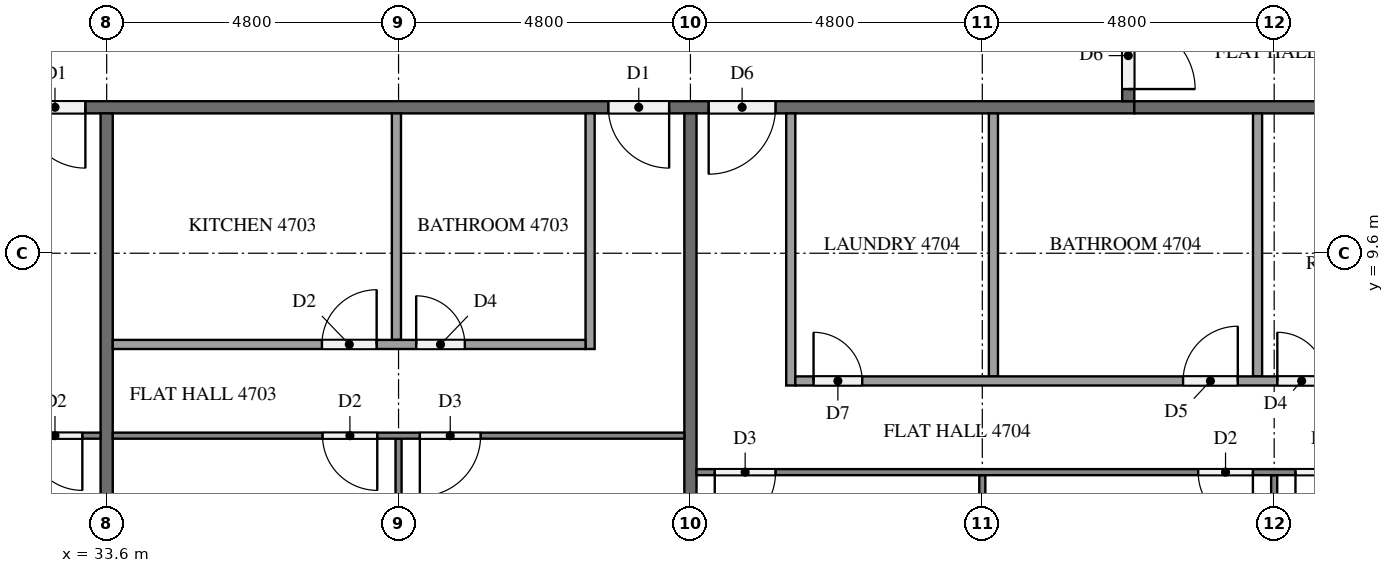
"""IFC4 building model, lengths in metres.
Left out: names, types, materials, properties, quantities, classifications, styles, units other than length and angle.
Written with IfcOpenShell. Run it as: python <this file> out.ifc"""

import sys

from ifc_helpers import new_model, si_unit, direction, frame, frame_2d, origin, place, context, subcontext, project, spatial, rectangle, extrude, element, fill, save


model = new_model("IFC4")
c1 = context("Model", 3, precision=1e-05, world=origin(), true_north=direction((0.0, 1.0)))
c2 = subcontext(c1, "Body", "Model", "MODEL_VIEW")
j1 = project(units=[si_unit("LENGTHUNIT", "METRE"), si_unit("PLANEANGLEUNIT", "RADIAN")], contexts=[c1])
p1 = place(None, origin())
s1 = spatial("IfcSite", under=j1, at=p1, CompositionType="ELEMENT")
p2 = place(p1, origin())
s2 = spatial("IfcBuilding", under=s1, at=p2, CompositionType="ELEMENT")
p3 = place(p2, frame((0.0, 0.0, 182.4)))
s3 = spatial("IfcBuildingStorey", under=s2, at=p3, CompositionType="ELEMENT", Elevation=182.4)
p4 = place(p3, frame((50.5, 12.0, 0.0), z_axis=(0.0, 0.0, 1.0), x_axis=(-1.0, 0.0, 0.0)))
e1 = element("IfcWall", 1, at=p4, inside=s3, PredefinedType="PARTITIONING", context=c2, shape_type="SweptSolid", body=[
    extrude(rectangle(XDim=38.6, YDim=0.2, at=frame_2d((19.3, 0.0))), origin(), (0.0, 0.0, 1.0), 3.2),
])
p5 = place(p4, frame((31.65, 0.0, 0.0)))
e2 = element("IfcOpeningElement", 2, at=p5, cuts=e1, PredefinedType="OPENING", context=c2, shape_type="SweptSolid", body=[
    extrude(rectangle(XDim=1.0, YDim=2.1, at=frame_2d((0.5, 1.05))), frame((0.0, 0.11, 0.0), z_axis=(0.0, -1.0, 0.0), x_axis=(1.0, 0.0, 0.0)), (0.0, 0.0, 1.0), 0.22),
])
p6 = place(p4, frame((17.25, 0.0, 0.0)))
e3 = element("IfcOpeningElement", 3, at=p6, cuts=e1, PredefinedType="OPENING", context=c2, shape_type="SweptSolid", body=[
    extrude(rectangle(XDim=1.0, YDim=2.1, at=frame_2d((0.5, 1.05))), frame((0.0, 0.11, 0.0), z_axis=(0.0, -1.0, 0.0), x_axis=(1.0, 0.0, 0.0)), (0.0, 0.0, 1.0), 0.22),
])
p7 = place(p4, frame((7.65, 0.0, 0.0)))
e4 = element("IfcOpeningElement", 4, at=p7, cuts=e1, PredefinedType="OPENING", context=c2, shape_type="SweptSolid", body=[
    extrude(rectangle(XDim=1.0, YDim=2.1, at=frame_2d((0.5, 1.05))), frame((0.0, 0.11, 0.0), z_axis=(0.0, -1.0, 0.0), x_axis=(1.0, 0.0, 0.0)), (0.0, 0.0, 1.0), 0.22),
])
p8 = place(p4, frame((5.9, 0.0, 0.0)))
e5 = element("IfcOpeningElement", 5, at=p8, cuts=e1, PredefinedType="OPENING", context=c2, shape_type="SweptSolid", body=[
    extrude(rectangle(XDim=1.1, YDim=2.1, at=frame_2d((0.55, 1.05))), frame((0.0, 0.11, 0.0), z_axis=(0.0, -1.0, 0.0), x_axis=(1.0, 0.0, 0.0)), (0.0, 0.0, 1.0), 0.22),
])
p9 = place(p3, frame((50.4, 40.7, 0.0), z_axis=(0.0, 0.0, 1.0), x_axis=(0.0, -1.0, 0.0)))
e6 = element("IfcWall", 6, at=p9, inside=s3, PredefinedType="PARTITIONING", context=c2, shape_type="SweptSolid", body=[
    extrude(rectangle(XDim=28.6, YDim=0.2, at=frame_2d((14.3, 0.0))), origin(), (0.0, 0.0, 1.0), 3.2),
])
p10 = place(p9, frame((27.3, 0.0, 0.0)))
e7 = element("IfcOpeningElement", 7, at=p10, cuts=e6, PredefinedType="OPENING", context=c2, shape_type="SweptSolid", body=[
    extrude(rectangle(XDim=1.1, YDim=2.1, at=frame_2d((0.55, 1.05))), frame((0.0, 0.11, 0.0), z_axis=(0.0, -1.0, 0.0), x_axis=(1.0, 0.0, 0.0)), (0.0, 0.0, 1.0), 0.22),
])
p11 = place(p9, frame((8.15, 0.0, 0.0)))
e8 = element("IfcOpeningElement", 8, at=p11, cuts=e6, PredefinedType="OPENING", context=c2, shape_type="SweptSolid", body=[
    extrude(rectangle(XDim=1.0, YDim=2.1, at=frame_2d((0.5, 1.05))), frame((0.0, 0.11, 0.0), z_axis=(0.0, -1.0, 0.0), x_axis=(1.0, 0.0, 0.0)), (0.0, 0.0, 1.0), 0.22),
])
p12 = place(p9, frame((0.95, 0.0, 0.0)))
e9 = element("IfcOpeningElement", 9, at=p12, cuts=e6, PredefinedType="OPENING", context=c2, shape_type="SweptSolid", body=[
    extrude(rectangle(XDim=1.0, YDim=2.1, at=frame_2d((0.5, 1.05))), frame((0.0, 0.11, 0.0), z_axis=(0.0, -1.0, 0.0), x_axis=(1.0, 0.0, 0.0)), (0.0, 0.0, 1.0), 0.22),
])
for number, where, z_axis, x_axis in (
    (10, (33.6, 11.9, 0.0), (0.0, 0.0, 1.0), (0.0, -1.0, 0.0)),
    (11, (43.2, 11.9, 0.0), (0.0, 0.0, 1.0), (0.0, -1.0, 0.0)),
):
    element("IfcWall", number, at=place(p3, frame(where, z_axis=z_axis, x_axis=x_axis)), inside=s3, PredefinedType="PARTITIONING", context=c2, shape_type="SweptSolid", body=[
        extrude(rectangle(XDim=11.8, YDim=0.2, at=frame_2d((5.9, 0.0))), origin(), (0.0, 0.0, 1.0), 3.2),
    ])
p13 = place(p3, frame((50.5, 12.0, 0.0), z_axis=(0.0, 0.0, 1.0), x_axis=(1.0, 0.0, 0.0)))
e12 = element("IfcWall", 12, at=p13, inside=s3, PredefinedType="PARTITIONING", context=c2, shape_type="SweptSolid", body=[
    extrude(rectangle(XDim=11.8, YDim=0.2, at=frame_2d((5.9, 0.0))), origin(), (0.0, 0.0, 1.0), 3.2),
])
p14 = place(p3, frame((33.5, 6.6, 0.0), z_axis=(0.0, 0.0, 1.0), x_axis=(-1.0, 0.0, 0.0)))
e13 = element("IfcWall", 13, at=p14, inside=s3, PredefinedType="PARTITIONING", context=c2, shape_type="SweptSolid", body=[
    extrude(rectangle(XDim=14.2, YDim=0.1, at=frame_2d((7.1, 0.0))), origin(), (0.0, 0.0, 1.0), 3.2),
])
p15 = place(p14, frame((0.3, 0.0, 0.0)))
e14 = element("IfcOpeningElement", 14, at=p15, cuts=e13, PredefinedType="OPENING", context=c2, shape_type="SweptSolid", body=[
    extrude(rectangle(XDim=0.9, YDim=2.1, at=frame_2d((0.45, 1.05))), frame((0.0, 0.06, 0.0), z_axis=(0.0, -1.0, 0.0), x_axis=(1.0, 0.0, 0.0)), (0.0, 0.0, 1.0), 0.12),
])
p16 = place(p14, frame((8.15, 0.0, 0.0)))
e15 = element("IfcOpeningElement", 15, at=p16, cuts=e13, PredefinedType="OPENING", context=c2, shape_type="SweptSolid", body=[
    extrude(rectangle(XDim=1.0, YDim=2.1, at=frame_2d((0.5, 1.05))), frame((0.0, 0.06, 0.0), z_axis=(0.0, -1.0, 0.0), x_axis=(1.0, 0.0, 0.0)), (0.0, 0.0, 1.0), 0.12),
])
p17 = place(p14, frame((9.85, 0.0, 0.0)))
e16 = element("IfcOpeningElement", 16, at=p17, cuts=e13, PredefinedType="OPENING", context=c2, shape_type="SweptSolid", body=[
    extrude(rectangle(XDim=0.9, YDim=2.1, at=frame_2d((0.45, 1.05))), frame((0.0, 0.06, 0.0), z_axis=(0.0, -1.0, 0.0), x_axis=(1.0, 0.0, 0.0)), (0.0, 0.0, 1.0), 0.12),
])
p18 = place(p3, frame((38.4, 6.55, 0.0), z_axis=(0.0, 0.0, 1.0), x_axis=(0.0, -1.0, 0.0)))
e17 = element("IfcWall", 17, at=p18, inside=s3, PredefinedType="PARTITIONING", context=c2, shape_type="SweptSolid", body=[
    extrude(rectangle(XDim=6.225, YDim=0.1, at=frame_2d((3.113, 0.0))), origin(), (0.0, 0.0, 1.0), 3.2),
])
p19 = place(p3, frame((43.1, 6.6, 0.0), z_axis=(0.0, 0.0, 1.0), x_axis=(-1.0, 0.0, 0.0)))
e18 = element("IfcWall", 18, at=p19, inside=s3, PredefinedType="PARTITIONING", context=c2, shape_type="SweptSolid", body=[
    extrude(rectangle(XDim=9.4, YDim=0.1, at=frame_2d((4.7, 0.0))), origin(), (0.0, 0.0, 1.0), 3.2),
])
p20 = place(p19, frame((3.35, 0.0, 0.0)))
e19 = element("IfcOpeningElement", 19, at=p20, cuts=e18, PredefinedType="OPENING", context=c2, shape_type="SweptSolid", body=[
    extrude(rectangle(XDim=1.0, YDim=2.1, at=frame_2d((0.5, 1.05))), frame((0.0, 0.06, 0.0), z_axis=(0.0, -1.0, 0.0), x_axis=(1.0, 0.0, 0.0)), (0.0, 0.0, 1.0), 0.12),
])
p21 = place(p19, frame((5.05, 0.0, 0.0)))
e20 = element("IfcOpeningElement", 20, at=p21, cuts=e18, PredefinedType="OPENING", context=c2, shape_type="SweptSolid", body=[
    extrude(rectangle(XDim=0.9, YDim=2.1, at=frame_2d((0.45, 1.05))), frame((0.0, 0.06, 0.0), z_axis=(0.0, -1.0, 0.0), x_axis=(1.0, 0.0, 0.0)), (0.0, 0.0, 1.0), 0.12),
])
p22 = place(p3, frame((38.365, 11.9, 0.0), z_axis=(0.0, 0.0, 1.0), x_axis=(0.0, -1.0, 0.0)))
e21 = element("IfcWall", 21, at=p22, inside=s3, PredefinedType="PARTITIONING", context=c2, shape_type="SweptSolid", body=[
    extrude(rectangle(XDim=3.725, YDim=0.15, at=frame_2d((1.862, 0.0))), origin(), (0.0, 0.0, 1.0), 3.2),
])
p23 = place(p3, frame((41.55, 11.9, 0.0), z_axis=(0.0, 0.0, 1.0), x_axis=(0.0, -1.0, 0.0)))
e22 = element("IfcWall", 22, at=p23, inside=s3, PredefinedType="PARTITIONING", context=c2, shape_type="SweptSolid", body=[
    extrude(rectangle(XDim=3.875, YDim=0.15, at=frame_2d((1.938, 0.0))), origin(), (0.0, 0.0, 1.0), 3.2),
])
p24 = place(p3, frame((33.7, 8.1, 0.0), z_axis=(0.0, 0.0, 1.0), x_axis=(1.0, 0.0, 0.0)))
e23 = element("IfcWall", 23, at=p24, inside=s3, PredefinedType="PARTITIONING", context=c2, shape_type="SweptSolid", body=[
    extrude(rectangle(XDim=7.775, YDim=0.15, at=frame_2d((3.888, 0.0))), origin(), (0.0, 0.0, 1.0), 3.2),
])
p25 = place(p24, frame((4.99, 0.0, 0.0)))
e24 = element("IfcOpeningElement", 24, at=p25, cuts=e23, PredefinedType="OPENING", context=c2, shape_type="SweptSolid", body=[
    extrude(rectangle(XDim=0.8, YDim=2.1, at=frame_2d((0.4, 1.05))), frame((0.0, 0.085, 0.0), z_axis=(0.0, -1.0, 0.0), x_axis=(1.0, 0.0, 0.0)), (0.0, 0.0, 1.0), 0.17),
])
p26 = place(p24, frame((3.44, 0.0, 0.0)))
e25 = element("IfcOpeningElement", 25, at=p26, cuts=e23, PredefinedType="OPENING", context=c2, shape_type="SweptSolid", body=[
    extrude(rectangle(XDim=0.9, YDim=2.1, at=frame_2d((0.45, 1.05))), frame((0.0, 0.085, 0.0), z_axis=(0.0, -1.0, 0.0), x_axis=(1.0, 0.0, 0.0)), (0.0, 0.0, 1.0), 0.17),
])
p27 = place(p3, frame((48.0, 5.95, 0.0), z_axis=(0.0, 0.0, 1.0), x_axis=(0.0, -1.0, 0.0)))
e26 = element("IfcWall", 26, at=p27, inside=s3, PredefinedType="PARTITIONING", context=c2, shape_type="SweptSolid", body=[
    extrude(rectangle(XDim=5.625, YDim=0.1, at=frame_2d((2.812, 0.0))), origin(), (0.0, 0.0, 1.0), 3.2),
])
p28 = place(p3, frame((52.8, 5.95, 0.0), z_axis=(0.0, 0.0, 1.0), x_axis=(0.0, -1.0, 0.0)))
e27 = element("IfcWall", 27, at=p28, inside=s3, PredefinedType="PARTITIONING", context=c2, shape_type="SweptSolid", body=[
    extrude(rectangle(XDim=5.85, YDim=0.1, at=frame_2d((2.925, 0.0))), origin(), (0.0, 0.0, 1.0), 3.2),
])
p29 = place(p3, frame((62.3, 6.0, 0.0), z_axis=(0.0, 0.0, 1.0), x_axis=(-1.0, 0.0, 0.0)))
e28 = element("IfcWall", 28, at=p29, inside=s3, PredefinedType="PARTITIONING", context=c2, shape_type="SweptSolid", body=[
    extrude(rectangle(XDim=19.0, YDim=0.1, at=frame_2d((9.5, 0.0))), origin(), (0.0, 0.0, 1.0), 3.2),
])
p30 = place(p29, frame((17.7, 0.0, 0.0)))
e29 = element("IfcOpeningElement", 29, at=p30, cuts=e28, PredefinedType="OPENING", context=c2, shape_type="SweptSolid", body=[
    extrude(rectangle(XDim=1.0, YDim=2.1, at=frame_2d((0.5, 1.05))), frame((0.0, 0.06, 0.0), z_axis=(0.0, -1.0, 0.0), x_axis=(1.0, 0.0, 0.0)), (0.0, 0.0, 1.0), 0.12),
])
p31 = place(p29, frame((9.85, 0.0, 0.0)))
e30 = element("IfcOpeningElement", 30, at=p31, cuts=e28, PredefinedType="OPENING", context=c2, shape_type="SweptSolid", body=[
    extrude(rectangle(XDim=0.9, YDim=2.1, at=frame_2d((0.45, 1.05))), frame((0.0, 0.06, 0.0), z_axis=(0.0, -1.0, 0.0), x_axis=(1.0, 0.0, 0.0)), (0.0, 0.0, 1.0), 0.12),
])
p32 = place(p29, frame((8.25, 0.0, 0.0)))
e31 = element("IfcOpeningElement", 31, at=p32, cuts=e28, PredefinedType="OPENING", context=c2, shape_type="SweptSolid", body=[
    extrude(rectangle(XDim=0.9, YDim=2.1, at=frame_2d((0.45, 1.05))), frame((0.0, 0.06, 0.0), z_axis=(0.0, -1.0, 0.0), x_axis=(1.0, 0.0, 0.0)), (0.0, 0.0, 1.0), 0.12),
])
p33 = place(p29, frame((0.4, 0.0, 0.0)))
e32 = element("IfcOpeningElement", 32, at=p33, cuts=e28, PredefinedType="OPENING", context=c2, shape_type="SweptSolid", body=[
    extrude(rectangle(XDim=0.9, YDim=2.1, at=frame_2d((0.45, 1.05))), frame((0.0, 0.06, 0.0), z_axis=(0.0, -1.0, 0.0), x_axis=(1.0, 0.0, 0.0)), (0.0, 0.0, 1.0), 0.12),
])
for number, where, z_axis, x_axis in (
    (33, (48.183, 11.9, 0.0), (0.0, 0.0, 1.0), (0.0, -1.0, 0.0)),
    (34, (52.527, 11.9, 0.0), (0.0, 0.0, 1.0), (0.0, -1.0, 0.0)),
):
    element("IfcWall", number, at=place(p3, frame(where, z_axis=z_axis, x_axis=x_axis)), inside=s3, PredefinedType="PARTITIONING", context=c2, shape_type="SweptSolid", body=[
        extrude(rectangle(XDim=4.325, YDim=0.15, at=frame_2d((2.163, 0.0))), origin(), (0.0, 0.0, 1.0), 3.2),
    ])
p34 = place(p3, frame((44.85, 11.9, 0.0), z_axis=(0.0, 0.0, 1.0), x_axis=(0.0, -1.0, 0.0)))
e35 = element("IfcWall", 35, at=p34, inside=s3, PredefinedType="PARTITIONING", context=c2, shape_type="SweptSolid", body=[
    extrude(rectangle(XDim=4.475, YDim=0.15, at=frame_2d((2.237, 0.0))), origin(), (0.0, 0.0, 1.0), 3.2),
])
p35 = place(p3, frame((44.925, 7.5, 0.0), z_axis=(0.0, 0.0, 1.0), x_axis=(1.0, 0.0, 0.0)))
e36 = element("IfcWall", 36, at=p35, inside=s3, PredefinedType="PARTITIONING", context=c2, shape_type="SweptSolid", body=[
    extrude(rectangle(XDim=17.375, YDim=0.15, at=frame_2d((8.688, 0.0))), origin(), (0.0, 0.0, 1.0), 3.2),
])
p36 = place(p35, frame((0.3, 0.0, 0.0)))
e37 = element("IfcOpeningElement", 37, at=p36, cuts=e36, PredefinedType="OPENING", context=c2, shape_type="SweptSolid", body=[
    extrude(rectangle(XDim=0.8, YDim=2.1, at=frame_2d((0.4, 1.05))), frame((0.0, 0.085, 0.0), z_axis=(0.0, -1.0, 0.0), x_axis=(1.0, 0.0, 0.0)), (0.0, 0.0, 1.0), 0.17),
])
p37 = place(p35, frame((6.377, 0.0, 0.0)))
e38 = element("IfcOpeningElement", 38, at=p37, cuts=e36, PredefinedType="OPENING", context=c2, shape_type="SweptSolid", body=[
    extrude(rectangle(XDim=0.9, YDim=2.1, at=frame_2d((0.45, 1.05))), frame((0.0, 0.085, 0.0), z_axis=(0.0, -1.0, 0.0), x_axis=(1.0, 0.0, 0.0)), (0.0, 0.0, 1.0), 0.17),
])
p38 = place(p35, frame((7.927, 0.0, 0.0)))
e39 = element("IfcOpeningElement", 39, at=p38, cuts=e36, PredefinedType="OPENING", context=c2, shape_type="SweptSolid", body=[
    extrude(rectangle(XDim=0.8, YDim=2.1, at=frame_2d((0.4, 1.05))), frame((0.0, 0.085, 0.0), z_axis=(0.0, -1.0, 0.0), x_axis=(1.0, 0.0, 0.0)), (0.0, 0.0, 1.0), 0.17),
])
p39 = place(p35, frame((16.125, 0.0, 0.0)))
e40 = element("IfcOpeningElement", 40, at=p39, cuts=e36, PredefinedType="OPENING", context=c2, shape_type="SweptSolid", body=[
    extrude(rectangle(XDim=0.9, YDim=2.1, at=frame_2d((0.45, 1.05))), frame((0.0, 0.085, 0.0), z_axis=(0.0, -1.0, 0.0), x_axis=(1.0, 0.0, 0.0)), (0.0, 0.0, 1.0), 0.17),
])
p40 = place(p6, origin())
e41 = element("IfcDoor", 41, at=p40, inside=s3, OperationType="SINGLE_SWING_LEFT", PredefinedType="DOOR", context=c2, shape_type="SweptSolid", body=[
    extrude(rectangle(XDim=1.0, YDim=2.1, at=frame_2d((0.5, 1.05))), frame((0.0, 0.025, 0.0), z_axis=(0.0, -1.0, 0.0), x_axis=(1.0, 0.0, 0.0)), (0.0, 0.0, 1.0), 0.05),
])
fill(e3, e41)
p41 = place(p7, origin())
e42 = element("IfcDoor", 42, at=p41, inside=s3, OperationType="SINGLE_SWING_LEFT", PredefinedType="DOOR", context=c2, shape_type="SweptSolid", body=[
    extrude(rectangle(XDim=1.0, YDim=2.1, at=frame_2d((0.5, 1.05))), frame((0.0, 0.025, 0.0), z_axis=(0.0, -1.0, 0.0), x_axis=(1.0, 0.0, 0.0)), (0.0, 0.0, 1.0), 0.05),
])
fill(e4, e42)
p42 = place(p8, origin())
e43 = element("IfcDoor", 43, at=p42, inside=s3, OperationType="SINGLE_SWING_RIGHT", PredefinedType="DOOR", context=c2, shape_type="SweptSolid", body=[
    extrude(rectangle(XDim=1.1, YDim=2.1, at=frame_2d((0.55, 1.05))), frame((0.0, 0.025, 0.0), z_axis=(0.0, -1.0, 0.0), x_axis=(1.0, 0.0, 0.0)), (0.0, 0.0, 1.0), 0.05),
])
fill(e5, e43)
p43 = place(p10, origin())
e44 = element("IfcDoor", 44, at=p43, inside=s3, OperationType="SINGLE_SWING_RIGHT", PredefinedType="DOOR", context=c2, shape_type="SweptSolid", body=[
    extrude(rectangle(XDim=1.1, YDim=2.1, at=frame_2d((0.55, 1.05))), frame((0.0, 0.025, 0.0), z_axis=(0.0, -1.0, 0.0), x_axis=(1.0, 0.0, 0.0)), (0.0, 0.0, 1.0), 0.05),
])
fill(e7, e44)
p44 = place(p15, origin())
e45 = element("IfcDoor", 45, at=p44, inside=s3, OperationType="SINGLE_SWING_LEFT", PredefinedType="DOOR", context=c2, shape_type="SweptSolid", body=[
    extrude(rectangle(XDim=0.9, YDim=2.1, at=frame_2d((0.45, 1.05))), frame((0.0, 0.025, 0.0), z_axis=(0.0, -1.0, 0.0), x_axis=(1.0, 0.0, 0.0)), (0.0, 0.0, 1.0), 0.05),
])
fill(e14, e45)
p45 = place(p20, origin())
e46 = element("IfcDoor", 46, at=p45, inside=s3, OperationType="SINGLE_SWING_RIGHT", PredefinedType="DOOR", context=c2, shape_type="SweptSolid", body=[
    extrude(rectangle(XDim=1.0, YDim=2.1, at=frame_2d((0.5, 1.05))), frame((0.0, 0.025, 0.0), z_axis=(0.0, -1.0, 0.0), x_axis=(1.0, 0.0, 0.0)), (0.0, 0.0, 1.0), 0.05),
])
fill(e19, e46)
p46 = place(p21, origin())
e47 = element("IfcDoor", 47, at=p46, inside=s3, OperationType="SINGLE_SWING_LEFT", PredefinedType="DOOR", context=c2, shape_type="SweptSolid", body=[
    extrude(rectangle(XDim=0.9, YDim=2.1, at=frame_2d((0.45, 1.05))), frame((0.0, 0.025, 0.0), z_axis=(0.0, -1.0, 0.0), x_axis=(1.0, 0.0, 0.0)), (0.0, 0.0, 1.0), 0.05),
])
fill(e20, e47)
p47 = place(p25, origin())
e48 = element("IfcDoor", 48, at=p47, inside=s3, OperationType="SINGLE_SWING_LEFT", PredefinedType="DOOR", context=c2, shape_type="SweptSolid", body=[
    extrude(rectangle(XDim=0.8, YDim=2.1, at=frame_2d((0.4, 1.05))), frame((0.0, 0.025, 0.0), z_axis=(0.0, -1.0, 0.0), x_axis=(1.0, 0.0, 0.0)), (0.0, 0.0, 1.0), 0.05),
])
fill(e24, e48)
p48 = place(p26, origin())
e49 = element("IfcDoor", 49, at=p48, inside=s3, OperationType="SINGLE_SWING_RIGHT", PredefinedType="DOOR", context=c2, shape_type="SweptSolid", body=[
    extrude(rectangle(XDim=0.9, YDim=2.1, at=frame_2d((0.45, 1.05))), frame((0.0, 0.025, 0.0), z_axis=(0.0, -1.0, 0.0), x_axis=(1.0, 0.0, 0.0)), (0.0, 0.0, 1.0), 0.05),
])
fill(e25, e49)
p49 = place(p30, origin())
e50 = element("IfcDoor", 50, at=p49, inside=s3, OperationType="SINGLE_SWING_RIGHT", PredefinedType="DOOR", context=c2, shape_type="SweptSolid", body=[
    extrude(rectangle(XDim=1.0, YDim=2.1, at=frame_2d((0.5, 1.05))), frame((0.0, 0.025, 0.0), z_axis=(0.0, -1.0, 0.0), x_axis=(1.0, 0.0, 0.0)), (0.0, 0.0, 1.0), 0.05),
])
fill(e29, e50)
p50 = place(p31, origin())
e51 = element("IfcDoor", 51, at=p50, inside=s3, OperationType="SINGLE_SWING_LEFT", PredefinedType="DOOR", context=c2, shape_type="SweptSolid", body=[
    extrude(rectangle(XDim=0.9, YDim=2.1, at=frame_2d((0.45, 1.05))), frame((0.0, 0.025, 0.0), z_axis=(0.0, -1.0, 0.0), x_axis=(1.0, 0.0, 0.0)), (0.0, 0.0, 1.0), 0.05),
])
fill(e30, e51)
p51 = place(p32, origin())
e52 = element("IfcDoor", 52, at=p51, inside=s3, OperationType="SINGLE_SWING_RIGHT", PredefinedType="DOOR", context=c2, shape_type="SweptSolid", body=[
    extrude(rectangle(XDim=0.9, YDim=2.1, at=frame_2d((0.45, 1.05))), frame((0.0, 0.025, 0.0), z_axis=(0.0, -1.0, 0.0), x_axis=(1.0, 0.0, 0.0)), (0.0, 0.0, 1.0), 0.05),
])
fill(e31, e52)
p52 = place(p36, origin())
e53 = element("IfcDoor", 53, at=p52, inside=s3, OperationType="SINGLE_SWING_LEFT", PredefinedType="DOOR", context=c2, shape_type="SweptSolid", body=[
    extrude(rectangle(XDim=0.8, YDim=2.1, at=frame_2d((0.4, 1.05))), frame((0.0, 0.025, 0.0), z_axis=(0.0, -1.0, 0.0), x_axis=(1.0, 0.0, 0.0)), (0.0, 0.0, 1.0), 0.05),
])
fill(e37, e53)
p53 = place(p37, origin())
e54 = element("IfcDoor", 54, at=p53, inside=s3, OperationType="SINGLE_SWING_RIGHT", PredefinedType="DOOR", context=c2, shape_type="SweptSolid", body=[
    extrude(rectangle(XDim=0.9, YDim=2.1, at=frame_2d((0.45, 1.05))), frame((0.0, 0.025, 0.0), z_axis=(0.0, -1.0, 0.0), x_axis=(1.0, 0.0, 0.0)), (0.0, 0.0, 1.0), 0.05),
])
fill(e38, e54)
p54 = place(p38, origin())
e55 = element("IfcDoor", 55, at=p54, inside=s3, OperationType="SINGLE_SWING_LEFT", PredefinedType="DOOR", context=c2, shape_type="SweptSolid", body=[
    extrude(rectangle(XDim=0.8, YDim=2.1, at=frame_2d((0.4, 1.05))), frame((0.0, 0.025, 0.0), z_axis=(0.0, -1.0, 0.0), x_axis=(1.0, 0.0, 0.0)), (0.0, 0.0, 1.0), 0.05),
])
fill(e39, e55)
save(model, sys.argv[1])
